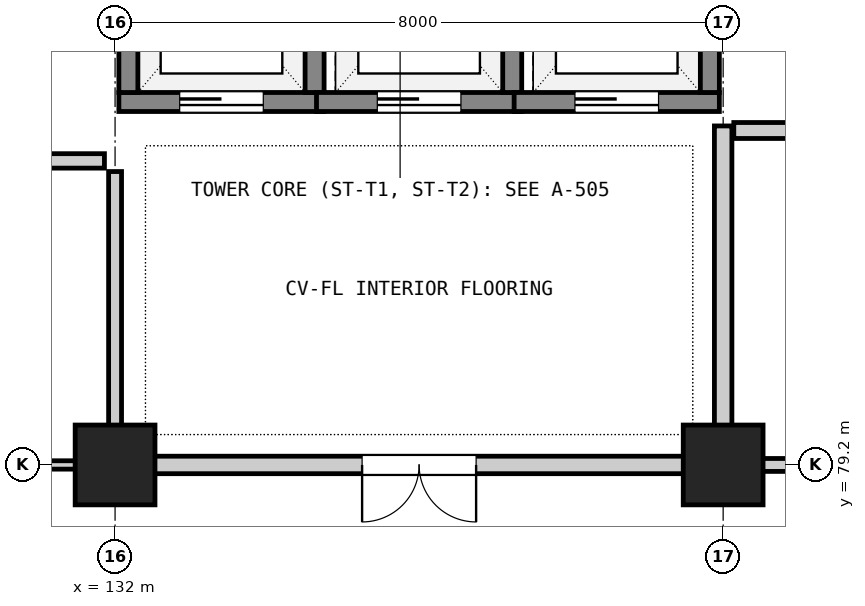
"""IFC4 building model, lengths in metres.
Left out: names, types, materials, properties, quantities, classifications, styles, units other than length and angle.
Written with IfcOpenShell. Run it as: python <this file> out.ifc"""

import sys

from ifc_helpers import new_model, si_unit, direction, frame, frame_2d, origin, origin_2d, place, context, subcontext, project, spatial, rectangle, extrude, element, fill, save


model = new_model("IFC4")
c1 = context("Model", 3, precision=1e-05, world=origin(), true_north=direction((0.0, 1.0)))
c2 = subcontext(c1, "Body", "Model", "MODEL_VIEW")
j1 = project(units=[si_unit("LENGTHUNIT", "METRE"), si_unit("PLANEANGLEUNIT", "RADIAN")], contexts=[c1])
p1 = place(None, origin())
s1 = spatial("IfcSite", under=j1, at=p1, CompositionType="ELEMENT")
p2 = place(p1, origin())
s2 = spatial("IfcBuilding", under=s1, at=p2, CompositionType="ELEMENT")
p3 = place(p2, origin())
s3 = spatial("IfcBuildingStorey", under=s2, at=p3, CompositionType="ELEMENT", Elevation=0.0)
for number, where, z_axis, x_axis in (
    (1, (132.0, 79.2, 0.0), (0.0, 0.0, 1.0), (1.0, 0.0, 0.0)),
    (2, (140.0, 79.2, 0.0), (0.0, 0.0, 1.0), (1.0, 0.0, 0.0)),
):
    element("IfcColumn", number, at=place(p3, frame(where, z_axis=z_axis, x_axis=x_axis)), inside=s3, PredefinedType="COLUMN", context=c2, shape_type="SweptSolid", body=[
        extrude(rectangle(XDim=1.05, YDim=1.05, at=origin_2d()), origin(), (0.0, 0.0, 1.0), 5.4),
    ])
p4 = place(p3, frame((132.05, 83.975, 0.0), z_axis=(0.0, 0.0, 1.0), x_axis=(1.0, 0.0, 0.0)))
e3 = element("IfcWall", 3, at=p4, inside=s3, PredefinedType="SHEAR", context=c2, shape_type="SweptSolid", body=[
    extrude(rectangle(XDim=2.7, YDim=0.25, at=frame_2d((1.35, 0.0))), origin(), (0.0, 0.0, 1.0), 5.08),
])
p5 = place(p4, frame((0.8, 0.0, 0.0)))
e4 = element("IfcOpeningElement", 4, at=p5, cuts=e3, PredefinedType="OPENING", context=c2, shape_type="SweptSolid", body=[
    extrude(rectangle(XDim=1.1, YDim=2.15, at=frame_2d((0.55, 1.075))), frame((0.0, 0.137, 0.0), z_axis=(0.0, -1.0, 0.0), x_axis=(1.0, 0.0, 0.0)), (0.0, 0.0, 1.0), 0.274),
])
for number, where, z_axis, x_axis in (
    (5, (132.175, 84.1, 0.0), (0.0, 0.0, 1.0), (0.0, 1.0, 0.0)),
    (6, (134.625, 84.1, 0.0), (0.0, 0.0, 1.0), (0.0, 1.0, 0.0)),
):
    element("IfcWall", number, at=place(p3, frame(where, z_axis=z_axis, x_axis=x_axis)), inside=s3, PredefinedType="SHEAR", context=c2, shape_type="SweptSolid", body=[
        extrude(rectangle(XDim=2.6, YDim=0.25, at=frame_2d((1.3, 0.0))), origin(), (0.0, 0.0, 1.0), 5.08),
    ])
p6 = place(p3, frame((134.65, 83.975, 0.0), z_axis=(0.0, 0.0, 1.0), x_axis=(1.0, 0.0, 0.0)))
e7 = element("IfcWall", 7, at=p6, inside=s3, PredefinedType="SHEAR", context=c2, shape_type="SweptSolid", body=[
    extrude(rectangle(XDim=2.7, YDim=0.25, at=frame_2d((1.35, 0.0))), origin(), (0.0, 0.0, 1.0), 5.08),
])
p7 = place(p6, frame((0.8, 0.0, 0.0)))
e8 = element("IfcOpeningElement", 8, at=p7, cuts=e7, PredefinedType="OPENING", context=c2, shape_type="SweptSolid", body=[
    extrude(rectangle(XDim=1.1, YDim=2.15, at=frame_2d((0.55, 1.075))), frame((0.0, 0.137, 0.0), z_axis=(0.0, -1.0, 0.0), x_axis=(1.0, 0.0, 0.0)), (0.0, 0.0, 1.0), 0.274),
])
p8 = place(p3, frame((137.225, 84.1, 0.0), z_axis=(0.0, 0.0, 1.0), x_axis=(0.0, 1.0, 0.0)))
e9 = element("IfcWall", 9, at=p8, inside=s3, PredefinedType="SHEAR", context=c2, shape_type="SweptSolid", body=[
    extrude(rectangle(XDim=2.6, YDim=0.25, at=frame_2d((1.3, 0.0))), origin(), (0.0, 0.0, 1.0), 5.08),
])
p9 = place(p3, frame((137.25, 83.975, 0.0), z_axis=(0.0, 0.0, 1.0), x_axis=(1.0, 0.0, 0.0)))
e10 = element("IfcWall", 10, at=p9, inside=s3, PredefinedType="SHEAR", context=c2, shape_type="SweptSolid", body=[
    extrude(rectangle(XDim=2.7, YDim=0.25, at=frame_2d((1.35, 0.0))), origin(), (0.0, 0.0, 1.0), 5.08),
])
p10 = place(p9, frame((0.8, 0.0, 0.0)))
e11 = element("IfcOpeningElement", 11, at=p10, cuts=e10, PredefinedType="OPENING", context=c2, shape_type="SweptSolid", body=[
    extrude(rectangle(XDim=1.1, YDim=2.15, at=frame_2d((0.55, 1.075))), frame((0.0, 0.137, 0.0), z_axis=(0.0, -1.0, 0.0), x_axis=(1.0, 0.0, 0.0)), (0.0, 0.0, 1.0), 0.274),
])
p11 = place(p3, frame((139.825, 84.1, 0.0), z_axis=(0.0, 0.0, 1.0), x_axis=(0.0, 1.0, 0.0)))
e12 = element("IfcWall", 12, at=p11, inside=s3, PredefinedType="SHEAR", context=c2, shape_type="SweptSolid", body=[
    extrude(rectangle(XDim=2.6, YDim=0.25, at=frame_2d((1.3, 0.0))), origin(), (0.0, 0.0, 1.0), 5.08),
])
p12 = place(p3, frame((128.34, 79.2, 0.0), z_axis=(0.0, 0.0, 1.0), x_axis=(1.0, 0.0, 0.0)))
e13 = element("IfcWall", 13, at=p12, inside=s3, PredefinedType="PARTITIONING", context=c2, shape_type="SweptSolid", body=[
    extrude(rectangle(XDim=3.52, YDim=0.11, at=frame_2d((1.76, 0.0))), origin(), (0.0, 0.0, 1.0), 4.425),
])
p13 = place(p12, frame((1.235, 0.0, 0.0)))
e14 = element("IfcOpeningElement", 14, at=p13, cuts=e13, PredefinedType="OPENING", context=c2, shape_type="SweptSolid", body=[
    extrude(rectangle(XDim=1.05, YDim=2.15, at=frame_2d((0.525, 1.075))), frame((0.0, 0.067, 0.0), z_axis=(0.0, -1.0, 0.0), x_axis=(1.0, 0.0, 0.0)), (0.0, 0.0, 1.0), 0.134),
])
p14 = place(p3, frame((128.34, 83.2, 0.0), z_axis=(0.0, 0.0, 1.0), x_axis=(1.0, 0.0, 0.0)))
e15 = element("IfcWall", 15, at=p14, inside=s3, PredefinedType="PARTITIONING", context=c2, shape_type="SweptSolid", body=[
    extrude(rectangle(XDim=3.52, YDim=0.19, at=frame_2d((1.76, 0.0))), origin(), (0.0, 0.0, 1.0), 5.08),
])
p15 = place(p3, frame((132.0, 79.34, 0.0), z_axis=(0.0, 0.0, 1.0), x_axis=(0.0, 1.0, 0.0)))
e16 = element("IfcWall", 16, at=p15, inside=s3, PredefinedType="PARTITIONING", context=c2, shape_type="SweptSolid", body=[
    extrude(rectangle(XDim=3.72, YDim=0.17, at=frame_2d((1.86, 0.0))), origin(), (0.0, 0.0, 1.0), 4.425),
])
p16 = place(p3, frame((132.14, 79.2, 0.0), z_axis=(0.0, 0.0, 1.0), x_axis=(1.0, 0.0, 0.0)))
e17 = element("IfcWall", 17, at=p16, inside=s3, PredefinedType="SOLIDWALL", context=c2, shape_type="SweptSolid", body=[
    extrude(rectangle(XDim=7.72, YDim=0.23, at=frame_2d((3.86, 0.0))), origin(), (0.0, 0.0, 1.0), 4.475),
])
p17 = place(p16, frame((3.11, 0.0, 0.0)))
e18 = element("IfcOpeningElement", 18, at=p17, cuts=e17, PredefinedType="OPENING", context=c2, shape_type="SweptSolid", body=[
    extrude(rectangle(XDim=1.5, YDim=2.2, at=frame_2d((0.75, 1.1))), frame((0.0, 0.127, 0.0), z_axis=(0.0, -1.0, 0.0), x_axis=(1.0, 0.0, 0.0)), (0.0, 0.0, 1.0), 0.254),
])
p18 = place(p3, frame((140.0, 79.34, 0.0), z_axis=(0.0, 0.0, 1.0), x_axis=(0.0, 1.0, 0.0)))
e19 = element("IfcWall", 19, at=p18, inside=s3, PredefinedType="SOLIDWALL", context=c2, shape_type="SweptSolid", body=[
    extrude(rectangle(XDim=4.32, YDim=0.23, at=frame_2d((2.16, 0.0))), origin(), (0.0, 0.0, 1.0), 4.325),
])
p19 = place(p3, frame((140.14, 83.6, 0.0), z_axis=(0.0, 0.0, 1.0), x_axis=(1.0, 0.0, 0.0)))
e20 = element("IfcWall", 20, at=p19, inside=s3, PredefinedType="SOLIDWALL", context=c2, shape_type="SweptSolid", body=[
    extrude(rectangle(XDim=7.72, YDim=0.21, at=frame_2d((3.86, 0.0))), origin(), (0.0, 0.0, 1.0), 5.08),
])
p20 = place(p3, frame((140.14, 79.2, 0.0), z_axis=(0.0, 0.0, 1.0), x_axis=(1.0, 0.0, 0.0)))
e21 = element("IfcWall", 21, at=p20, inside=s3, PredefinedType="PARTITIONING", context=c2, shape_type="SweptSolid", body=[
    extrude(rectangle(XDim=4.32, YDim=0.17, at=frame_2d((2.16, 0.0))), origin(), (0.0, 0.0, 1.0), 4.475),
])
p21 = place(p20, frame((1.66, 0.0, 0.0)))
e22 = element("IfcOpeningElement", 22, at=p21, cuts=e21, PredefinedType="OPENING", context=c2, shape_type="SweptSolid", body=[
    extrude(rectangle(XDim=1.0, YDim=2.15, at=frame_2d((0.5, 1.075))), frame((0.0, 0.097, 0.0), z_axis=(0.0, -1.0, 0.0), x_axis=(1.0, 0.0, 0.0)), (0.0, 0.0, 1.0), 0.194),
])
p22 = place(p5, origin())
e23 = element("IfcDoor", 23, at=p22, inside=s3, OperationType="SLIDING_TO_LEFT", PredefinedType="DOOR", context=c2, shape_type="SweptSolid", body=[
    extrude(rectangle(XDim=1.1, YDim=2.15, at=frame_2d((0.55, 1.075))), frame((0.0, 0.025, 0.0), z_axis=(0.0, -1.0, 0.0), x_axis=(1.0, 0.0, 0.0)), (0.0, 0.0, 1.0), 0.05),
])
fill(e4, e23)
p23 = place(p7, origin())
e24 = element("IfcDoor", 24, at=p23, inside=s3, OperationType="SLIDING_TO_LEFT", PredefinedType="DOOR", context=c2, shape_type="SweptSolid", body=[
    extrude(rectangle(XDim=1.1, YDim=2.15, at=frame_2d((0.55, 1.075))), frame((0.0, 0.025, 0.0), z_axis=(0.0, -1.0, 0.0), x_axis=(1.0, 0.0, 0.0)), (0.0, 0.0, 1.0), 0.05),
])
fill(e8, e24)
p24 = place(p10, origin())
e25 = element("IfcDoor", 25, at=p24, inside=s3, OperationType="SLIDING_TO_LEFT", PredefinedType="DOOR", context=c2, shape_type="SweptSolid", body=[
    extrude(rectangle(XDim=1.1, YDim=2.15, at=frame_2d((0.55, 1.075))), frame((0.0, 0.025, 0.0), z_axis=(0.0, -1.0, 0.0), x_axis=(1.0, 0.0, 0.0)), (0.0, 0.0, 1.0), 0.05),
])
fill(e11, e25)
p25 = place(p17, frame((1.5, 0.0, 0.0), z_axis=(0.0, 0.0, 1.0), x_axis=(-1.0, 0.0, 0.0)))
e26 = element("IfcDoor", 26, at=p25, inside=s3, OperationType="DOUBLE_DOOR_SINGLE_SWING", PredefinedType="DOOR", context=c2, shape_type="SweptSolid", body=[
    extrude(rectangle(XDim=1.5, YDim=2.2, at=frame_2d((0.75, 1.1))), frame((0.0, 0.025, 0.0), z_axis=(0.0, -1.0, 0.0), x_axis=(1.0, 0.0, 0.0)), (0.0, 0.0, 1.0), 0.05),
])
fill(e18, e26)
save(model, sys.argv[1])
